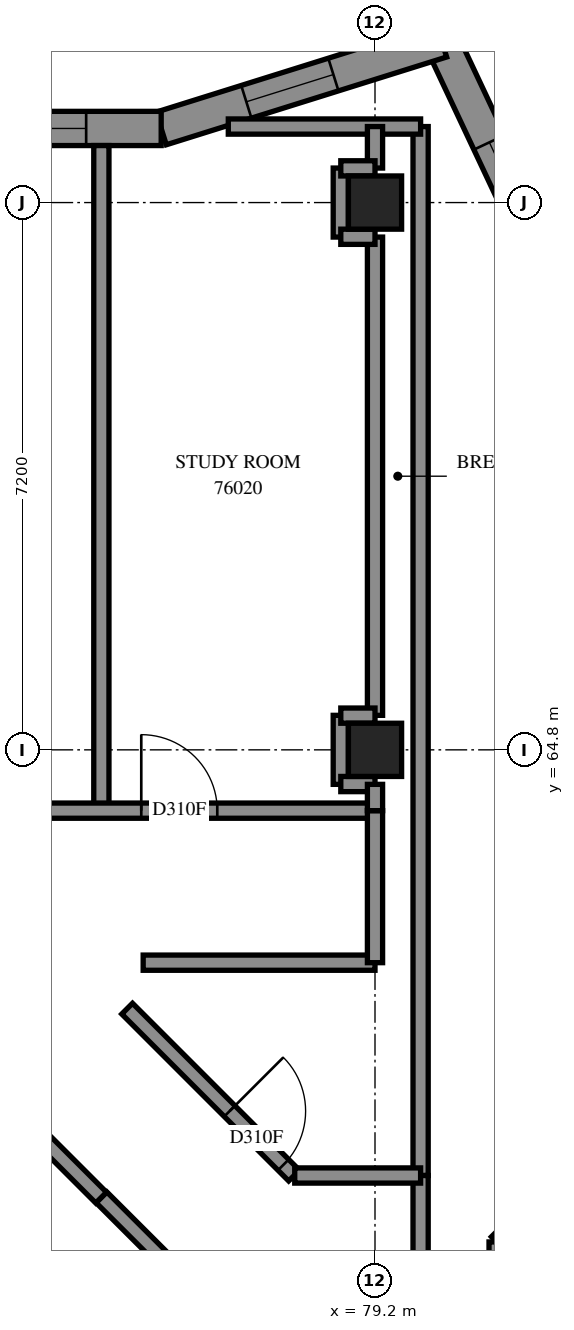
"""IFC4 building model, lengths in metres.
Left out: names, types, materials, properties, quantities, classifications, styles, units other than length and angle.
Written with IfcOpenShell. Run it as: python <this file> out.ifc"""

import sys

from ifc_helpers import new_model, si_unit, direction, frame, frame_2d, origin, origin_2d, place, context, subcontext, project, spatial, polyline, rectangle, outline, extrude, element, fill, save


model = new_model("IFC4")
c1 = context("Model", 3, precision=1e-05, world=origin(), true_north=direction((0.0, 1.0)))
c2 = subcontext(c1, "Body", "Model", "MODEL_VIEW")
j1 = project(units=[si_unit("LENGTHUNIT", "METRE"), si_unit("PLANEANGLEUNIT", "RADIAN")], contexts=[c1])
p1 = place(None, origin())
s1 = spatial("IfcSite", under=j1, at=p1, CompositionType="ELEMENT")
p2 = place(p1, origin())
s2 = spatial("IfcBuilding", under=s1, at=p2, CompositionType="ELEMENT")
p3 = place(p2, frame((0.0, 0.0, 277.8)))
s3 = spatial("IfcBuildingStorey", under=s2, at=p3, CompositionType="ELEMENT", Elevation=277.8)
for number, where, z_axis, x_axis in (
    (1, (79.2, 64.8, 0.0), (0.0, 0.0, 1.0), (1.0, 0.0, 0.0)),
    (2, (79.2, 72.0, 0.0), (0.0, 0.0, 1.0), (1.0, 0.0, 0.0)),
):
    element("IfcColumn", number, at=place(p3, frame(where, z_axis=z_axis, x_axis=x_axis)), inside=s3, PredefinedType="COLUMN", context=c2, shape_type="SweptSolid", body=[
        extrude(rectangle(XDim=0.7, YDim=0.7, at=origin_2d()), origin(), (0.0, 0.0, 1.0), 3.1),
    ])
p4 = place(p3, frame((76.513, 49.231, -0.3), z_axis=(0.0, 0.0, 1.0), x_axis=(0.7071067812, 0.7071067812, 0.0)))
e3 = element("IfcWall", 3, at=p4, inside=s3, PredefinedType="SHEAR", context=c2, shape_type="SweptSolid", body=[
    extrude(rectangle(XDim=14.4, YDim=0.4, at=frame_2d((7.2, 0.0))), origin(), (0.0, 0.0, 1.0), 2.7),
])
p5 = place(p4, frame((4.55, 0.0, 0.3)))
e4 = element("IfcOpeningElement", 4, at=p5, cuts=e3, PredefinedType="OPENING", context=c2, shape_type="SweptSolid", body=[
    extrude(rectangle(XDim=1.1, YDim=2.1, at=frame_2d((0.55, 1.05))), frame((0.0, 0.21, 0.0), z_axis=(0.0, -1.0, 0.0), x_axis=(1.0, 0.0, 0.0)), (0.0, 0.0, 1.0), 0.42),
])
p6 = place(p4, frame((11.35, 0.0, 0.3)))
e5 = element("IfcOpeningElement", 5, at=p6, cuts=e3, PredefinedType="OPENING", context=c2, shape_type="SweptSolid", body=[
    extrude(rectangle(XDim=1.1, YDim=2.1, at=frame_2d((0.55, 1.05))), frame((0.0, 0.21, 0.0), z_axis=(0.0, -1.0, 0.0), x_axis=(1.0, 0.0, 0.0)), (0.0, 0.0, 1.0), 0.42),
])
p7 = place(p3, frame((81.528, 71.04, 0.0), z_axis=(0.0, 0.0, 1.0), x_axis=(-0.4256305639, 0.9048970234, 0.0)))
e6 = element("IfcWall", 6, at=p7, inside=s3, PredefinedType="SOLIDWALL", context=c2, shape_type="SweptSolid", body=[
    extrude(outline(polyline([(0.06, -0.225), (3.61, -0.225), (3.217, 0.225), (-0.06, 0.225), (0.06, -0.225)])), origin(), (0.0, 0.0, 1.0), 3.1),
])
p8 = place(p7, frame((0.736, 0.0, 0.45)))
e7 = element("IfcOpeningElement", 7, at=p8, cuts=e6, PredefinedType="OPENING", context=c2, shape_type="SweptSolid", body=[
    extrude(rectangle(XDim=1.2, YDim=2.55, at=frame_2d((0.6, 1.275))), frame((0.0, 0.235, 0.0), z_axis=(0.0, -1.0, 0.0), x_axis=(1.0, 0.0, 0.0)), (0.0, 0.0, 1.0), 0.47),
])
p9 = place(p3, frame((80.075, 74.13, 0.0), z_axis=(0.0, 0.0, 1.0), x_axis=(-0.9543297625, -0.2987552583, 0.0)))
e8 = element("IfcWall", 8, at=p9, inside=s3, PredefinedType="SOLIDWALL", context=c2, shape_type="SweptSolid", body=[
    extrude(outline(polyline([(-0.196, -0.225), (3.83, -0.225), (3.899, 0.225), (0.196, 0.225), (-0.196, -0.225)])), origin(), (0.0, 0.0, 1.0), 3.1),
])
p10 = place(p9, frame((1.491, 0.0, 0.45)))
e9 = element("IfcOpeningElement", 9, at=p10, cuts=e8, PredefinedType="OPENING", context=c2, shape_type="SweptSolid", body=[
    extrude(rectangle(XDim=1.2, YDim=2.55, at=frame_2d((0.6, 1.275))), frame((0.0, 0.235, 0.0), z_axis=(0.0, -1.0, 0.0), x_axis=(1.0, 0.0, 0.0)), (0.0, 0.0, 1.0), 0.47),
])
p11 = place(p3, frame((76.387, 72.975, 0.0), z_axis=(0.0, 0.0, 1.0), x_axis=(-1.0, 0.0, 0.0)))
e10 = element("IfcWall", 10, at=p11, inside=s3, PredefinedType="SOLIDWALL", context=c2, shape_type="SweptSolid", body=[
    extrude(outline(polyline([(0.034, -0.225), (7.72, -0.225), (7.755, 0.225), (-0.034, 0.225), (0.034, -0.225)])), origin(), (0.0, 0.0, 1.0), 3.1),
])
p12 = place(p11, frame((0.987, 0.0, 0.45)))
e11 = element("IfcOpeningElement", 11, at=p12, cuts=e10, PredefinedType="OPENING", context=c2, shape_type="SweptSolid", body=[
    extrude(rectangle(XDim=2.8, YDim=2.55, at=frame_2d((1.4, 1.275))), frame((0.0, 0.235, 0.0), z_axis=(0.0, -1.0, 0.0), x_axis=(1.0, 0.0, 0.0)), (0.0, 0.0, 1.0), 0.47),
])
p13 = place(p11, frame((4.562, 0.0, 0.45)))
e12 = element("IfcOpeningElement", 12, at=p13, cuts=e10, PredefinedType="OPENING", context=c2, shape_type="SweptSolid", body=[
    extrude(rectangle(XDim=2.8, YDim=2.55, at=frame_2d((1.4, 1.275))), frame((0.0, 0.235, 0.0), z_axis=(0.0, -1.0, 0.0), x_axis=(1.0, 0.0, 0.0)), (0.0, 0.0, 1.0), 0.47),
])
p14 = place(p3, frame((79.8, 59.2, 0.0), z_axis=(0.0, 0.0, 1.0), x_axis=(0.0, 1.0, 0.0)))
e13 = element("IfcWall", 13, at=p14, inside=s3, PredefinedType="PARTITIONING", context=c2, shape_type="SweptSolid", body=[
    extrude(rectangle(XDim=13.8, YDim=0.2, at=frame_2d((6.9, 0.0))), origin(), (0.0, 0.0, 1.0), 3.1),
])
p15 = place(p3, frame((80.803, 58.323, 0.0), z_axis=(0.0, 0.0, 1.0), x_axis=(0.7070026249, 0.7072109222, 0.0)))
e14 = element("IfcWall", 14, at=p15, inside=s3, PredefinedType="PARTITIONING", context=c2, shape_type="SweptSolid", body=[
    extrude(rectangle(XDim=9.602, YDim=0.2, at=frame_2d((4.801, 0.0))), origin(), (0.0, 0.0, 1.0), 3.1),
])
p16 = place(p3, frame((75.6, 64.0, 0.0), z_axis=(0.0, 0.0, 1.0), x_axis=(0.0, 1.0, 0.0)))
e15 = element("IfcWall", 15, at=p16, inside=s3, PredefinedType="PARTITIONING", context=c2, shape_type="SweptSolid", body=[
    extrude(rectangle(XDim=8.75, YDim=0.2, at=frame_2d((4.375, 0.0))), origin(), (0.0, 0.0, 1.0), 3.1),
])
p17 = place(p3, frame((80.802, 56.633, 0.0), z_axis=(0.0, 0.0, 1.0), x_axis=(0.7071067812, 0.7071067812, 0.0)))
e16 = element("IfcWall", 16, at=p17, inside=s3, PredefinedType="PARTITIONING", context=c2, shape_type="SweptSolid", body=[
    extrude(rectangle(XDim=8.533, YDim=0.2, at=frame_2d((4.267, 0.0))), origin(), (0.0, 0.0, 1.0), 3.1),
])
p18 = place(p17, frame((0.817, 0.0, 0.0)))
e17 = element("IfcOpeningElement", 17, at=p18, cuts=e16, PredefinedType="OPENING", context=c2, shape_type="SweptSolid", body=[
    extrude(rectangle(XDim=1.0, YDim=2.1, at=frame_2d((0.5, 1.05))), frame((0.0, 0.11, 0.0), z_axis=(0.0, -1.0, 0.0), x_axis=(1.0, 0.0, 0.0)), (0.0, 0.0, 1.0), 0.22),
])
p19 = place(p3, frame((79.2, 65.254, 0.0), z_axis=(0.0, 0.0, 1.0), x_axis=(0.0, 1.0, 0.0)))
e18 = element("IfcWall", 18, at=p19, inside=s3, PredefinedType="PARTITIONING", context=c2, shape_type="SweptSolid", body=[
    extrude(rectangle(XDim=6.292, YDim=0.2, at=frame_2d((3.146, 0.0))), origin(), (0.0, 0.0, 1.0), 3.1),
])
p20 = place(p3, frame((74.402, 64.0, 0.0), z_axis=(0.0, 0.0, 1.0), x_axis=(1.0, 0.0, 0.0)))
e19 = element("IfcWall", 19, at=p20, inside=s3, PredefinedType="PARTITIONING", context=c2, shape_type="SweptSolid", body=[
    extrude(rectangle(XDim=4.798, YDim=0.2, at=frame_2d((2.399, 0.0))), origin(), (0.0, 0.0, 1.0), 3.1),
])
p21 = place(p20, frame((1.723, 0.0, 0.0)))
e20 = element("IfcOpeningElement", 20, at=p21, cuts=e19, PredefinedType="OPENING", context=c2, shape_type="SweptSolid", body=[
    extrude(rectangle(XDim=1.0, YDim=2.1, at=frame_2d((0.5, 1.05))), frame((0.0, 0.11, 0.0), z_axis=(0.0, -1.0, 0.0), x_axis=(1.0, 0.0, 0.0)), (0.0, 0.0, 1.0), 0.22),
])
p22 = place(p3, frame((79.8, 55.914, 0.0), z_axis=(0.0, 0.0, 1.0), x_axis=(0.0, 1.0, 0.0)))
e21 = element("IfcWall", 21, at=p22, inside=s3, PredefinedType="PARTITIONING", context=c2, shape_type="SweptSolid", body=[
    extrude(rectangle(XDim=3.286, YDim=0.2, at=frame_2d((1.643, 0.0))), origin(), (0.0, 0.0, 1.0), 3.1),
])
p23 = place(p3, frame((75.939, 61.395, 0.0), z_axis=(0.0, 0.0, 1.0), x_axis=(0.7071067812, -0.7071067812, 0.0)))
e22 = element("IfcWall", 22, at=p23, inside=s3, PredefinedType="PARTITIONING", context=c2, shape_type="SweptSolid", body=[
    extrude(rectangle(XDim=3.106, YDim=0.2, at=frame_2d((1.553, 0.0))), origin(), (0.0, 0.0, 1.0), 3.1),
])
p24 = place(p23, frame((1.906, 0.0, 0.0)))
e23 = element("IfcOpeningElement", 23, at=p24, cuts=e22, PredefinedType="OPENING", context=c2, shape_type="SweptSolid", body=[
    extrude(rectangle(XDim=1.0, YDim=2.1, at=frame_2d((0.5, 1.05))), frame((0.0, 0.11, 0.0), z_axis=(0.0, -1.0, 0.0), x_axis=(1.0, 0.0, 0.0)), (0.0, 0.0, 1.0), 0.22),
])
p25 = place(p3, frame((76.15, 62.0, 0.0), z_axis=(0.0, 0.0, 1.0), x_axis=(1.0, 0.0, 0.0)))
e24 = element("IfcWall", 24, at=p25, inside=s3, PredefinedType="PARTITIONING", context=c2, shape_type="SweptSolid", body=[
    extrude(rectangle(XDim=3.05, YDim=0.2, at=frame_2d((1.525, 0.0))), origin(), (0.0, 0.0, 1.0), 3.1),
])
p26 = place(p3, frame((75.601, 58.913, 0.0), z_axis=(0.0, 0.0, 1.0), x_axis=(0.707460777, -0.7067526081, 0.0)))
e25 = element("IfcWall", 25, at=p26, inside=s3, PredefinedType="PARTITIONING", context=c2, shape_type="SweptSolid", body=[
    extrude(rectangle(XDim=2.824, YDim=0.2, at=frame_2d((1.412, 0.0))), origin(), (0.0, 0.0, 1.0), 3.1),
])
p27 = place(p3, frame((77.27, 73.0, 0.0), z_axis=(0.0, 0.0, 1.0), x_axis=(1.0, 0.0, 0.0)))
e26 = element("IfcWall", 26, at=p27, inside=s3, PredefinedType="PARTITIONING", context=c2, shape_type="SweptSolid", body=[
    extrude(rectangle(XDim=2.53, YDim=0.2, at=frame_2d((1.265, 0.0))), origin(), (0.0, 0.0, 1.0), 3.1),
])
p28 = place(p3, frame((79.2, 62.0, 0.0), z_axis=(0.0, 0.0, 1.0), x_axis=(0.0, 1.0, 0.0)))
e27 = element("IfcWall", 27, at=p28, inside=s3, PredefinedType="PARTITIONING", context=c2, shape_type="SweptSolid", body=[
    extrude(rectangle(XDim=2.0, YDim=0.2, at=frame_2d((1.0, 0.0))), origin(), (0.0, 0.0, 1.0), 3.1),
])
p29 = place(p3, frame((74.399, 60.107, 0.0), z_axis=(0.0, 0.0, 1.0), x_axis=(0.7071067812, -0.7071067812, 0.0)))
e28 = element("IfcWall", 28, at=p29, inside=s3, PredefinedType="PARTITIONING", context=c2, shape_type="SweptSolid", body=[
    extrude(rectangle(XDim=1.694, YDim=0.2, at=frame_2d((0.847, 0.0))), origin(), (0.0, 0.0, 1.0), 3.1),
])
p30 = place(p3, frame((78.144, 59.2, 0.0), z_axis=(0.0, 0.0, 1.0), x_axis=(1.0, 0.0, 0.0)))
e29 = element("IfcWall", 29, at=p30, inside=s3, PredefinedType="PARTITIONING", context=c2, shape_type="SweptSolid", body=[
    extrude(rectangle(XDim=1.656, YDim=0.2, at=frame_2d((0.828, 0.0))), origin(), (0.0, 0.0, 1.0), 3.1),
])
p31 = place(p3, frame((80.8, 56.912, 0.0), z_axis=(0.0, 0.0, 1.0), x_axis=(0.0, 1.0, 0.0)))
e30 = element("IfcWall", 30, at=p31, inside=s3, PredefinedType="PARTITIONING", context=c2, shape_type="SweptSolid", body=[
    extrude(rectangle(XDim=1.414, YDim=0.2, at=frame_2d((0.707, 0.0))), origin(), (0.0, 0.0, 1.0), 3.1),
])
for number, where, z_axis, x_axis in (
    (31, (78.75, 64.346, 0.0), (0.0, 0.0, 1.0), (0.0, 1.0, 0.0)),
    (32, (78.75, 71.546, 0.0), (0.0, 0.0, 1.0), (0.0, 1.0, 0.0)),
):
    element("IfcWall", number, at=place(p3, frame(where, z_axis=z_axis, x_axis=x_axis)), inside=s3, PredefinedType="PARTITIONING", context=c2, shape_type="SweptSolid", body=[
        extrude(rectangle(XDim=0.908, YDim=0.2, at=frame_2d((0.454, 0.0))), origin(), (0.0, 0.0, 1.0), 3.1),
    ])
p32 = place(p3, frame((79.2, 72.454, 0.0), z_axis=(0.0, 0.0, 1.0), x_axis=(0.0, 1.0, 0.0)))
e33 = element("IfcWall", 33, at=p32, inside=s3, PredefinedType="PARTITIONING", context=c2, shape_type="SweptSolid", body=[
    extrude(rectangle(XDim=0.546, YDim=0.2, at=frame_2d((0.273, 0.0))), origin(), (0.0, 0.0, 1.0), 3.1),
])
for number, where, z_axis, x_axis in (
    (34, (78.75, 71.55, 0.0), (0.0, 0.0, 1.0), (1.0, 0.0, 0.0)),
    (35, (78.75, 72.45, 0.0), (0.0, 0.0, 1.0), (1.0, 0.0, 0.0)),
    (36, (78.75, 65.25, 0.0), (0.0, 0.0, 1.0), (1.0, 0.0, 0.0)),
    (37, (78.75, 64.35, 0.0), (0.0, 0.0, 1.0), (1.0, 0.0, 0.0)),
):
    element("IfcWall", number, at=place(p3, frame(where, z_axis=z_axis, x_axis=x_axis)), inside=s3, PredefinedType="PARTITIONING", context=c2, shape_type="SweptSolid", body=[
        extrude(rectangle(XDim=0.45, YDim=0.2, at=frame_2d((0.225, 0.0))), origin(), (0.0, 0.0, 1.0), 3.1),
    ])
p33 = place(p3, frame((79.2, 64.0, 0.0), z_axis=(0.0, 0.0, 1.0), x_axis=(0.0, 1.0, 0.0)))
e38 = element("IfcWall", 38, at=p33, inside=s3, PredefinedType="PARTITIONING", context=c2, shape_type="SweptSolid", body=[
    extrude(rectangle(XDim=0.346, YDim=0.2, at=frame_2d((0.173, 0.0))), origin(), (0.0, 0.0, 1.0), 3.1),
])
p34 = place(p8, origin())
e39 = element("IfcWindow", 39, at=p34, inside=s3, PartitioningType="SINGLE_PANEL", PredefinedType="WINDOW", context=c2, shape_type="SweptSolid", body=[
    extrude(rectangle(XDim=1.2, YDim=2.55, at=frame_2d((0.6, 1.275))), frame((0.0, 0.205, 0.0), z_axis=(0.0, -1.0, 0.0), x_axis=(1.0, 0.0, 0.0)), (0.0, 0.0, 1.0), 0.06),
])
fill(e7, e39)
p35 = place(p10, origin())
e40 = element("IfcWindow", 40, at=p35, inside=s3, PartitioningType="SINGLE_PANEL", PredefinedType="WINDOW", context=c2, shape_type="SweptSolid", body=[
    extrude(rectangle(XDim=1.2, YDim=2.55, at=frame_2d((0.6, 1.275))), frame((0.0, 0.205, 0.0), z_axis=(0.0, -1.0, 0.0), x_axis=(1.0, 0.0, 0.0)), (0.0, 0.0, 1.0), 0.06),
])
fill(e9, e40)
p36 = place(p12, origin())
e41 = element("IfcWindow", 41, at=p36, inside=s3, PartitioningType="SINGLE_PANEL", PredefinedType="WINDOW", context=c2, shape_type="SweptSolid", body=[
    extrude(rectangle(XDim=2.8, YDim=2.55, at=frame_2d((1.4, 1.275))), frame((0.0, 0.205, 0.0), z_axis=(0.0, -1.0, 0.0), x_axis=(1.0, 0.0, 0.0)), (0.0, 0.0, 1.0), 0.06),
])
fill(e11, e41)
p37 = place(p21, origin())
e42 = element("IfcDoor", 42, at=p37, inside=s3, OperationType="SINGLE_SWING_LEFT", PredefinedType="DOOR", context=c2, shape_type="SweptSolid", body=[
    extrude(rectangle(XDim=1.0, YDim=2.1, at=frame_2d((0.5, 1.05))), frame((0.0, 0.025, 0.0), z_axis=(0.0, -1.0, 0.0), x_axis=(1.0, 0.0, 0.0)), (0.0, 0.0, 1.0), 0.05),
])
fill(e20, e42)
p38 = place(p24, origin())
e43 = element("IfcDoor", 43, at=p38, inside=s3, OperationType="SINGLE_SWING_LEFT", PredefinedType="DOOR", context=c2, shape_type="SweptSolid", body=[
    extrude(rectangle(XDim=1.0, YDim=2.1, at=frame_2d((0.5, 1.05))), frame((0.0, 0.025, 0.0), z_axis=(0.0, -1.0, 0.0), x_axis=(1.0, 0.0, 0.0)), (0.0, 0.0, 1.0), 0.05),
])
fill(e23, e43)
save(model, sys.argv[1])
